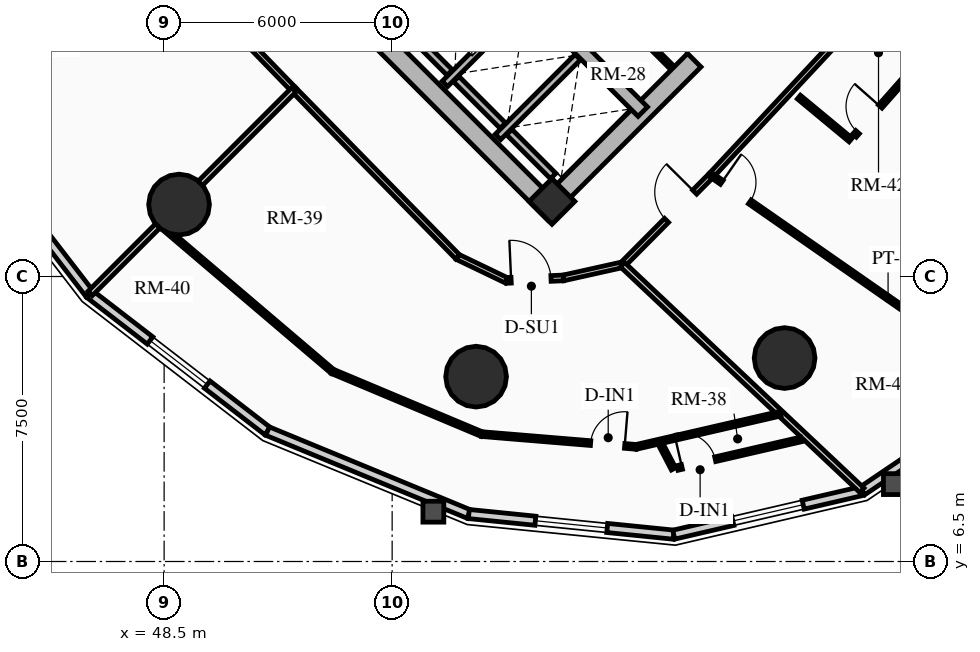
"""IFC4 building model, lengths in metres.
Left out: names, types, materials, properties, quantities, classifications, styles, units other than length and angle.
Written with IfcOpenShell. Run it as: python <this file> out.ifc"""

import sys

from ifc_helpers import new_model, si_unit, direction, frame, frame_2d, origin, origin_2d, place, context, subcontext, project, spatial, rectangle, circle, extrude, source, transform, mapped, element, fill, save


model = new_model("IFC4")
c1 = context("Model", 3, precision=1e-05, world=origin(), true_north=direction((0.0, 1.0)))
c2 = subcontext(c1, "Body", "Model", "MODEL_VIEW")
j1 = project(units=[si_unit("LENGTHUNIT", "METRE"), si_unit("PLANEANGLEUNIT", "RADIAN")], contexts=[c1])
p1 = place(None, origin())
s1 = spatial("IfcSite", under=j1, at=p1, CompositionType="ELEMENT")
p2 = place(p1, origin())
s2 = spatial("IfcBuilding", under=s1, at=p2, CompositionType="ELEMENT")
p3 = place(p2, frame((0.0, 0.0, 45.28)))
s3 = spatial("IfcBuildingStorey", under=s2, at=p3, CompositionType="ELEMENT", Elevation=45.28)
p4 = place(p3, frame((58.773, 15.661, 0.0), z_axis=(0.0, 0.0, 1.0), x_axis=(-0.707106781187, 0.707106781187, 0.0)))
e1 = element("IfcWall", 1, at=p4, inside=s3, PredefinedType="SHEAR", context=c2, shape_type="SweptSolid", body=[
    extrude(rectangle(XDim=14.3, YDim=0.5, at=frame_2d((7.15, 0.0))), origin(), (0.0, 0.0, 1.0), 2.91),
])
p5 = place(p3, frame((58.596, 15.838, 0.0), z_axis=(0.0, 0.0, 1.0), x_axis=(0.707106781187, 0.707106781187, 0.0)))
e2 = element("IfcWall", 2, at=p5, inside=s3, PredefinedType="SHEAR", context=c2, shape_type="SweptSolid", body=[
    extrude(rectangle(XDim=10.7, YDim=0.5, at=frame_2d((5.35, 0.0))), origin(), (0.0, 0.0, 1.0), 2.91),
])
m1 = source(origin(), c2, "Body", "SweptSolid", [
    extrude(rectangle(XDim=1.5, YDim=2.02, at=frame_2d((0.75, 1.01))), frame((0.0, 0.26, 0.0), z_axis=(0.0, -1.0, 0.0), x_axis=(1.0, 0.0, 0.0)), (0.0, 0.0, 1.0), 0.52),
])
p6 = place(p5, frame((5.45, 0.0, 0.0)))
e3 = element("IfcOpeningElement", 3, at=p6, cuts=e2, PredefinedType="OPENING", context=c2, shape_type="MappedRepresentation", body=[
    mapped(m1, transform((0.0, 0.0, 0.0), x_axis=(1.0, 0.0, 0.0), y_axis=(0.0, 1.0, 0.0), z_axis=(0.0, 0.0, 1.0), scale=1.0)),
])
p7 = place(p3, frame((61.096, 18.338, 0.0), z_axis=(0.0, 0.0, 1.0), x_axis=(-0.707106781187, 0.707106781187, 0.0)))
e4 = element("IfcWall", 4, at=p7, inside=s3, PredefinedType="SHEAR", context=c2, shape_type="SweptSolid", body=[
    extrude(rectangle(XDim=13.8, YDim=0.35, at=frame_2d((6.9, 0.0))), origin(), (0.0, 0.0, 1.0), 2.91),
])
m2 = source(origin(), c2, "Body", "SweptSolid", [
    extrude(rectangle(XDim=1.1, YDim=2.015, at=frame_2d((0.55, 1.007))), frame((0.0, 0.185, 0.0), z_axis=(0.0, -1.0, 0.0), x_axis=(1.0, 0.0, 0.0)), (0.0, 0.0, 1.0), 0.37),
])
p8 = place(p7, frame((4.9, 0.0, 0.0)))
e5 = element("IfcOpeningElement", 5, at=p8, cuts=e4, PredefinedType="OPENING", context=c2, shape_type="MappedRepresentation", body=[
    mapped(m2, transform((0.0, 0.0, 0.0), x_axis=(1.0, 0.0, 0.0), y_axis=(0.0, 1.0, 0.0), z_axis=(0.0, 0.0, 1.0), scale=1.0)),
])
m3 = source(origin(), c2, "Body", "SweptSolid", [
    extrude(rectangle(XDim=1.15, YDim=2.02, at=frame_2d((0.575, 1.01))), frame((0.0, 0.185, 0.0), z_axis=(0.0, -1.0, 0.0), x_axis=(1.0, 0.0, 0.0)), (0.0, 0.0, 1.0), 0.37),
])
p9 = place(p7, frame((7.32, 0.0, 0.0)))
e6 = element("IfcOpeningElement", 6, at=p9, cuts=e4, PredefinedType="OPENING", context=c2, shape_type="MappedRepresentation", body=[
    mapped(m3, transform((0.0, 0.0, 0.0), x_axis=(1.0, 0.0, 0.0), y_axis=(0.0, 1.0, 0.0), z_axis=(0.0, 0.0, 1.0), scale=1.0)),
])
p10 = place(p3, frame((58.706, 15.976, 0.0), z_axis=(0.0, 0.0, 1.0), x_axis=(0.707106781187, 0.707106781187, 0.0)))
e7 = element("IfcColumn", 7, at=p10, inside=s3, PredefinedType="COLUMN", context=c2, shape_type="SweptSolid", body=[
    extrude(rectangle(XDim=0.85, YDim=0.85, at=origin_2d()), origin(), (0.0, 0.0, 1.0), 2.91),
])
for number, where, z_axis, x_axis in (
    (8, (48.893, 15.893, 0.0), (0.0, 0.0, 1.0), (1.0, 0.0, 0.0)),
    (9, (56.709, 11.365, 0.0), (0.0, 0.0, 1.0), (1.0, 0.0, 0.0)),
    (10, (64.827, 11.854, 0.0), (0.0, 0.0, 1.0), (1.0, 0.0, 0.0)),
):
    element("IfcColumn", number, at=place(p3, frame(where, z_axis=z_axis, x_axis=x_axis)), inside=s3, PredefinedType="USERDEFINED", context=c2, shape_type="SweptSolid", body=[
        extrude(circle(Radius=0.8, at=origin_2d()), origin(), (0.0, 0.0, 1.0), 2.91),
    ])
p11 = place(p3, frame((46.541, 13.541, 0.0), z_axis=(0.0, 0.0, 1.0), x_axis=(-0.610494906082, 0.792020182601, 0.0)))
e11 = element("IfcWall", 11, at=p11, inside=s3, PredefinedType="SOLIDWALL", context=c2, shape_type="SweptSolid", body=[
    extrude(rectangle(XDim=5.911, YDim=0.24, at=frame_2d((2.956, 0.0))), origin(), (0.0, 0.0, 1.0), 2.073),
])
p12 = place(p3, frame((51.222, 9.932, 0.0), z_axis=(0.0, 0.0, 1.0), x_axis=(-0.792020182601, 0.610494906082, 0.0)))
e12 = element("IfcWall", 12, at=p12, inside=s3, PredefinedType="SOLIDWALL", context=c2, shape_type="SweptSolid", body=[
    extrude(rectangle(XDim=5.911, YDim=0.24, at=frame_2d((2.956, 0.0))), origin(), (0.0, 0.0, 1.0), 2.073),
])
m4 = source(origin(), c2, "Body", "SweptSolid", [
    extrude(rectangle(XDim=1.9, YDim=1.35, at=frame_2d((0.95, 0.675))), frame((0.0, 0.13, 0.0), z_axis=(0.0, -1.0, 0.0), x_axis=(1.0, 0.0, 0.0)), (0.0, 0.0, 1.0), 0.26),
])
p13 = place(p12, frame((2.005, 0.0, 0.65)))
e13 = element("IfcOpeningElement", 13, at=p13, cuts=e12, PredefinedType="OPENING", context=c2, shape_type="MappedRepresentation", body=[
    mapped(m4, transform((0.0, 0.0, 0.0), x_axis=(1.0, 0.0, 0.0), y_axis=(0.0, 1.0, 0.0), z_axis=(0.0, 0.0, 1.0), scale=1.0)),
])
p14 = place(p3, frame((56.518, 7.749, 0.0), z_axis=(0.0, 0.0, 1.0), x_axis=(-0.924542988536, 0.381077764176, 0.0)))
e14 = element("IfcWall", 14, at=p14, inside=s3, PredefinedType="SOLIDWALL", context=c2, shape_type="SweptSolid", body=[
    extrude(rectangle(XDim=5.728, YDim=0.24, at=frame_2d((2.864, 0.0))), origin(), (0.0, 0.0, 1.0), 2.073),
])
p15 = place(p3, frame((61.91, 7.206, 0.0), z_axis=(0.0, 0.0, 1.0), x_axis=(-0.994968263437, 0.100190592135, 0.0)))
e15 = element("IfcWall", 15, at=p15, inside=s3, PredefinedType="SOLIDWALL", context=c2, shape_type="SweptSolid", body=[
    extrude(rectangle(XDim=5.419, YDim=0.24, at=frame_2d((2.71, 0.0))), origin(), (0.0, 0.0, 1.0), 2.073),
])
p16 = place(p15, frame((1.76, 0.0, 0.65)))
e16 = element("IfcOpeningElement", 16, at=p16, cuts=e15, PredefinedType="OPENING", context=c2, shape_type="MappedRepresentation", body=[
    mapped(m4, transform((0.0, 0.0, 0.0), x_axis=(1.0, 0.0, 0.0), y_axis=(0.0, 1.0, 0.0), z_axis=(0.0, 0.0, 1.0), scale=1.0)),
])
p17 = place(p3, frame((66.871, 8.356, 0.0), z_axis=(0.0, 0.0, 1.0), x_axis=(-0.974167686491, -0.22582585901, 0.0)))
e17 = element("IfcWall", 17, at=p17, inside=s3, PredefinedType="SOLIDWALL", context=c2, shape_type="SweptSolid", body=[
    extrude(rectangle(XDim=5.092, YDim=0.24, at=frame_2d((2.546, 0.0))), origin(), (0.0, 0.0, 1.0), 2.073),
])
p18 = place(p17, frame((1.596, 0.0, 0.65)))
e18 = element("IfcOpeningElement", 18, at=p18, cuts=e17, PredefinedType="OPENING", context=c2, shape_type="MappedRepresentation", body=[
    mapped(m4, transform((0.0, 0.0, 0.0), x_axis=(1.0, 0.0, 0.0), y_axis=(0.0, 1.0, 0.0), z_axis=(0.0, 0.0, 1.0), scale=1.0)),
])
p19 = place(p3, frame((70.914, 11.086, 0.0), z_axis=(0.0, 0.0, 1.0), x_axis=(-0.828748297084, -0.559621532896, 0.0)))
e19 = element("IfcWall", 19, at=p19, inside=s3, PredefinedType="SOLIDWALL", context=c2, shape_type="SweptSolid", body=[
    extrude(rectangle(XDim=4.879, YDim=0.24, at=frame_2d((2.439, 0.0))), origin(), (0.0, 0.0, 1.0), 2.073),
])
p20 = place(p3, frame((55.888, 19.069, 0.0), z_axis=(0.0, 0.0, 1.0), x_axis=(0.707106781187, 0.707106781187, 0.0)))
e20 = element("IfcWall", 20, at=p20, inside=s3, PredefinedType="SHEAR", context=c2, shape_type="SweptSolid", body=[
    extrude(rectangle(XDim=2.97, YDim=0.2, at=frame_2d((1.485, 0.0))), origin(), (0.0, 0.0, 1.0), 2.91),
])
p21 = place(p3, frame((56.015, 19.366, 0.0), z_axis=(0.0, 0.0, 1.0), x_axis=(-0.707106781187, 0.707106781187, 0.0)))
e21 = element("IfcWall", 21, at=p21, inside=s3, PredefinedType="SHEAR", context=c2, shape_type="SweptSolid", body=[
    extrude(rectangle(XDim=2.44, YDim=0.2, at=frame_2d((1.22, 0.0))), origin(), (0.0, 0.0, 1.0), 2.91),
])
p22 = place(p3, frame((57.284, 17.673, 0.0), z_axis=(0.0, 0.0, 1.0), x_axis=(0.707147878904, 0.70706568108, 0.0)))
e22 = element("IfcWall", 22, at=p22, inside=s3, PredefinedType="SHEAR", context=c2, shape_type="SweptSolid", body=[
    extrude(rectangle(XDim=2.97, YDim=0.2, at=frame_2d((1.485, 0.0))), origin(), (0.0, 0.0, 1.0), 2.91),
])
p23 = place(p3, frame((57.412, 17.97, 0.0), z_axis=(0.0, 0.0, 1.0), x_axis=(-0.707106781187, 0.707106781187, 0.0)))
e23 = element("IfcWall", 23, at=p23, inside=s3, PredefinedType="SHEAR", context=c2, shape_type="SweptSolid", body=[
    extrude(rectangle(XDim=1.735, YDim=0.2, at=frame_2d((0.867, 0.0))), origin(), (0.0, 0.0, 1.0), 2.91),
])
p24 = place(p3, frame((58.737, 16.644, 0.0), z_axis=(0.0, 0.0, 1.0), x_axis=(-0.707032117043, 0.707181437447, 0.0)))
e24 = element("IfcWall", 24, at=p24, inside=s3, PredefinedType="SHEAR", context=c2, shape_type="SweptSolid", body=[
    extrude(rectangle(XDim=1.635, YDim=0.2, at=frame_2d((0.817, 0.0))), origin(), (0.0, 0.0, 1.0), 2.91),
])
p25 = place(p3, frame((61.835, 19.529, 0.0), z_axis=(0.0, 0.0, 1.0), x_axis=(-0.707146413884, 0.707067146267, 0.0)))
e25 = element("IfcWall", 25, at=p25, inside=s3, PredefinedType="PARTITIONING", context=c2, shape_type="SweptSolid", body=[
    extrude(rectangle(XDim=3.08, YDim=0.125, at=frame_2d((1.54, 0.0))), origin(), (0.0, 0.0, 1.0), 2.635),
])
m5 = source(origin(), c2, "Body", "SweptSolid", [
    extrude(rectangle(XDim=0.9, YDim=2.005, at=frame_2d((0.45, 1.002))), frame((0.0, 0.073, 0.0), z_axis=(0.0, -1.0, 0.0), x_axis=(1.0, 0.0, 0.0)), (0.0, 0.0, 1.0), 0.145),
])
p26 = place(p25, frame((1.05, 0.0, 0.0)))
e26 = element("IfcOpeningElement", 26, at=p26, cuts=e25, PredefinedType="OPENING", context=c2, shape_type="MappedRepresentation", body=[
    mapped(m5, transform((0.0, 0.0, 0.0), x_axis=(1.0, 0.0, 0.0), y_axis=(0.0, 1.0, 0.0), z_axis=(0.0, 0.0, 1.0), scale=1.0)),
])
p27 = place(p3, frame((47.706, 23.253, 0.0), z_axis=(0.0, 0.0, 1.0), x_axis=(0.696179266346, -0.717867974707, 0.0)))
e27 = element("IfcWall", 27, at=p27, inside=s3, PredefinedType="PARTITIONING", context=c2, shape_type="SweptSolid", body=[
    extrude(rectangle(XDim=6.045, YDim=0.15, at=frame_2d((3.022, 0.0))), origin(), (0.0, 0.0, 1.0), 2.635),
])
m6 = source(origin(), c2, "Body", "SweptSolid", [
    extrude(rectangle(XDim=1.05, YDim=2.015, at=frame_2d((0.525, 1.007))), frame((0.0, 0.085, 0.0), z_axis=(0.0, -1.0, 0.0), x_axis=(1.0, 0.0, 0.0)), (0.0, 0.0, 1.0), 0.17),
])
p28 = place(p27, frame((2.497, 0.0, 0.0)))
e28 = element("IfcOpeningElement", 28, at=p28, cuts=e27, PredefinedType="OPENING", context=c2, shape_type="MappedRepresentation", body=[
    mapped(m6, transform((0.0, 0.0, 0.0), x_axis=(1.0, 0.0, 0.0), y_axis=(0.0, 1.0, 0.0), z_axis=(0.0, 0.0, 1.0), scale=1.0)),
])
p29 = place(p3, frame((51.914, 18.914, 0.0), z_axis=(0.0, 0.0, 1.0), x_axis=(0.699999313799, -0.714143515465, 0.0)))
e29 = element("IfcWall", 29, at=p29, inside=s3, PredefinedType="PARTITIONING", context=c2, shape_type="SweptSolid", body=[
    extrude(rectangle(XDim=6.162, YDim=0.15, at=frame_2d((3.081, 0.0))), origin(), (0.0, 0.0, 1.0), 2.159),
])
p30 = place(p3, frame((56.227, 14.513, 0.0), z_axis=(0.0, 0.0, 1.0), x_axis=(0.901477579283, -0.432825801044, 0.0)))
e30 = element("IfcWall", 30, at=p30, inside=s3, PredefinedType="PARTITIONING", context=c2, shape_type="SweptSolid", body=[
    extrude(rectangle(XDim=1.424, YDim=0.15, at=frame_2d((0.712, 0.0))), origin(), (0.0, 0.0, 1.0), 2.205),
])
p31 = place(p3, frame((57.511, 13.897, 0.0), z_axis=(0.0, 0.0, 1.0), x_axis=(0.999024538494, 0.044158481476, 0.0)))
e31 = element("IfcWall", 31, at=p31, inside=s3, PredefinedType="PARTITIONING", context=c2, shape_type="SweptSolid", body=[
    extrude(rectangle(XDim=1.498, YDim=0.15, at=frame_2d((0.749, 0.0))), origin(), (0.0, 0.0, 1.0), 2.159),
])
p32 = place(p31, frame((0.12, 0.0, 0.0)))
e32 = element("IfcOpeningElement", 32, at=p32, cuts=e31, PredefinedType="OPENING", context=c2, shape_type="MappedRepresentation", body=[
    mapped(m6, transform((0.0, 0.0, 0.0), x_axis=(1.0, 0.0, 0.0), y_axis=(0.0, 1.0, 0.0), z_axis=(0.0, 0.0, 1.0), scale=1.0)),
])
p33 = place(p3, frame((59.008, 13.963, 0.0), z_axis=(0.0, 0.0, 1.0), x_axis=(0.976020856791, 0.21767702476, 0.0)))
e33 = element("IfcWall", 33, at=p33, inside=s3, PredefinedType="PARTITIONING", context=c2, shape_type="SweptSolid", body=[
    extrude(rectangle(XDim=1.593, YDim=0.15, at=frame_2d((0.796, 0.0))), origin(), (0.0, 0.0, 1.0), 2.205),
])
p34 = place(p3, frame((60.562, 14.31, 0.0), z_axis=(0.0, 0.0, 1.0), x_axis=(0.704566236161, 0.709638230975, 0.0)))
e34 = element("IfcWall", 34, at=p34, inside=s3, PredefinedType="PARTITIONING", context=c2, shape_type="SweptSolid", body=[
    extrude(rectangle(XDim=3.321, YDim=0.15, at=frame_2d((1.661, 0.0))), origin(), (0.0, 0.0, 1.0), 2.159),
])
p35 = place(p34, frame((1.643, 0.0, 0.0)))
e35 = element("IfcOpeningElement", 35, at=p35, cuts=e34, PredefinedType="OPENING", context=c2, shape_type="MappedRepresentation", body=[
    mapped(m6, transform((0.0, 0.0, 0.0), x_axis=(1.0, 0.0, 0.0), y_axis=(0.0, 1.0, 0.0), z_axis=(0.0, 0.0, 1.0), scale=1.0)),
])
p36 = place(p3, frame((62.903, 16.667, 0.0), z_axis=(0.0, 0.0, 1.0), x_axis=(0.682371947497, 0.731005147225, 0.0)))
e36 = element("IfcWall", 36, at=p36, inside=s3, PredefinedType="PARTITIONING", context=c2, shape_type="SweptSolid", body=[
    extrude(rectangle(XDim=6.642, YDim=0.15, at=frame_2d((3.321, 0.0))), origin(), (0.0, 0.0, 1.0), 2.159),
])
p37 = place(p3, frame((51.914, 18.914, 0.0), z_axis=(0.0, 0.0, 1.0), x_axis=(-0.707106781187, -0.707106781187, 0.0)))
e37 = element("IfcWall", 37, at=p37, inside=s3, PredefinedType="PARTITIONING", context=c2, shape_type="SweptSolid", body=[
    extrude(rectangle(XDim=7.579, YDim=0.16, at=frame_2d((3.79, 0.0))), origin(), (0.0, 0.0, 1.0), 2.073),
])
p38 = place(p3, frame((60.562, 14.31, 0.0), z_axis=(0.0, 0.0, 1.0), x_axis=(0.727781661561, -0.685808904211, 0.0)))
e38 = element("IfcWall", 38, at=p38, inside=s3, PredefinedType="PARTITIONING", context=c2, shape_type="SweptSolid", body=[
    extrude(rectangle(XDim=8.655, YDim=0.16, at=frame_2d((4.328, 0.0))), origin(), (0.0, 0.0, 1.0), 2.073),
])
p39 = place(p3, frame((67.435, 21.521, 0.0), z_axis=(0.0, 0.0, 1.0), x_axis=(0.6962628802, -0.717786877601, 0.0)))
e39 = element("IfcWall", 39, at=p39, inside=s3, PredefinedType="PARTITIONING", context=c2, shape_type="SweptSolid", body=[
    extrude(rectangle(XDim=8.893, YDim=0.16, at=frame_2d((4.446, 0.0))), origin(), (0.0, 0.0, 1.0), 2.073),
])
p40 = place(p3, frame((48.377, 15.377, 0.0), z_axis=(0.0, 0.0, 1.0), x_axis=(0.761505943152, -0.648157927163, 0.0)))
e40 = element("IfcWall", 40, at=p40, inside=s3, PredefinedType="PARTITIONING", context=c2, shape_type="SweptSolid", body=[
    extrude(rectangle(XDim=5.979, YDim=0.125, at=frame_2d((2.99, 0.0))), origin(), (0.0, 0.0, 1.0), 2.635),
])
p41 = place(p3, frame((52.93, 11.501, 0.0), z_axis=(0.0, 0.0, 1.0), x_axis=(0.922051248037, -0.387067818338, 0.0)))
e41 = element("IfcWall", 41, at=p41, inside=s3, PredefinedType="PARTITIONING", context=c2, shape_type="SweptSolid", body=[
    extrude(rectangle(XDim=4.26, YDim=0.125, at=frame_2d((2.13, 0.0))), origin(), (0.0, 0.0, 1.0), 2.159),
])
p42 = place(p3, frame((56.858, 9.852, 0.0), z_axis=(0.0, 0.0, 1.0), x_axis=(0.996604967548, -0.082331881181, 0.0)))
e42 = element("IfcWall", 42, at=p42, inside=s3, PredefinedType="PARTITIONING", context=c2, shape_type="SweptSolid", body=[
    extrude(rectangle(XDim=4.077, YDim=0.125, at=frame_2d((2.039, 0.0))), origin(), (0.0, 0.0, 1.0), 2.205),
])
p43 = place(p42, frame((2.874, 0.0, 0.0)))
e43 = element("IfcOpeningElement", 43, at=p43, cuts=e42, PredefinedType="OPENING", context=c2, shape_type="MappedRepresentation", body=[
    mapped(m5, transform((0.0, 0.0, 0.0), x_axis=(1.0, 0.0, 0.0), y_axis=(0.0, 1.0, 0.0), z_axis=(0.0, 0.0, 1.0), scale=1.0)),
])
p44 = place(p3, frame((60.921, 9.517, 0.0), z_axis=(0.0, 0.0, 1.0), x_axis=(0.974453436038, 0.224589627973, 0.0)))
e44 = element("IfcWall", 44, at=p44, inside=s3, PredefinedType="PARTITIONING", context=c2, shape_type="SweptSolid", body=[
    extrude(rectangle(XDim=3.898, YDim=0.125, at=frame_2d((1.949, 0.0))), origin(), (0.0, 0.0, 1.0), 2.205),
])
p45 = place(p3, frame((61.564, 9.589, 0.0), z_axis=(0.0, 0.0, 1.0), x_axis=(0.462168536246, -0.886792108729, 0.0)))
e45 = element("IfcWall", 45, at=p45, inside=s3, PredefinedType="PARTITIONING", context=c2, shape_type="SweptSolid", body=[
    extrude(rectangle(XDim=0.735, YDim=0.125, at=frame_2d((0.367, 0.0))), origin(), (0.0, 0.0, 1.0), 2.635),
])
p46 = place(p3, frame((62.008, 8.962, 0.0), z_axis=(0.0, 0.0, 1.0), x_axis=(0.974365294983, 0.224971713626, 0.0)))
e46 = element("IfcWall", 46, at=p46, inside=s3, PredefinedType="PARTITIONING", context=c2, shape_type="SweptSolid", body=[
    extrude(rectangle(XDim=3.337, YDim=0.125, at=frame_2d((1.668, 0.0))), origin(), (0.0, 0.0, 1.0), 2.635),
])
p47 = place(p46, frame((0.12, 0.0, 0.0)))
e47 = element("IfcOpeningElement", 47, at=p47, cuts=e46, PredefinedType="OPENING", context=c2, shape_type="MappedRepresentation", body=[
    mapped(m5, transform((0.0, 0.0, 0.0), x_axis=(1.0, 0.0, 0.0), y_axis=(0.0, 1.0, 0.0), z_axis=(0.0, 0.0, 1.0), scale=1.0)),
])
p48 = place(p3, frame((62.903, 16.667, 0.0), z_axis=(0.0, 0.0, 1.0), x_axis=(0.820761665638, -0.571270766116, 0.0)))
e48 = element("IfcWall", 48, at=p48, inside=s3, PredefinedType="PARTITIONING", context=c2, shape_type="SweptSolid", body=[
    extrude(rectangle(XDim=9.743, YDim=0.125, at=frame_2d((4.872, 0.0))), origin(), (0.0, 0.0, 1.0), 2.073),
])
p49 = place(p48, frame((0.33, 0.0, 0.0)))
e49 = element("IfcOpeningElement", 49, at=p49, cuts=e48, PredefinedType="OPENING", context=c2, shape_type="MappedRepresentation", body=[
    mapped(m5, transform((0.0, 0.0, 0.0), x_axis=(1.0, 0.0, 0.0), y_axis=(0.0, 1.0, 0.0), z_axis=(0.0, 0.0, 1.0), scale=1.0)),
])
p50 = place(p3, frame((65.202, 18.721, 0.0), z_axis=(0.0, 0.0, 1.0), x_axis=(0.769814202386, -0.638268042287, 0.0)))
e50 = element("IfcWall", 50, at=p50, inside=s3, PredefinedType="PARTITIONING", context=c2, shape_type="SweptSolid", body=[
    extrude(rectangle(XDim=1.769, YDim=0.125, at=frame_2d((0.884, 0.0))), origin(), (0.0, 0.0, 1.0), 2.635),
])
p51 = place(p3, frame((66.667, 17.709, 0.0), z_axis=(0.0, 0.0, 1.0), x_axis=(0.662510581678, 0.749052554341, 0.0)))
e51 = element("IfcWall", 51, at=p51, inside=s3, PredefinedType="PARTITIONING", context=c2, shape_type="SweptSolid", body=[
    extrude(rectangle(XDim=2.996, YDim=0.125, at=frame_2d((1.498, 0.0))), origin(), (0.0, 0.0, 1.0), 2.159),
])
p52 = place(p51, frame((0.12, 0.0, 0.0)))
e52 = element("IfcOpeningElement", 52, at=p52, cuts=e51, PredefinedType="OPENING", context=c2, shape_type="MappedRepresentation", body=[
    mapped(m5, transform((0.0, 0.0, 0.0), x_axis=(1.0, 0.0, 0.0), y_axis=(0.0, 1.0, 0.0), z_axis=(0.0, 0.0, 1.0), scale=1.0)),
])
m7 = source(origin(), c2, "Body", "SweptSolid", [
    extrude(rectangle(XDim=1.9, YDim=1.35, at=frame_2d((0.95, 0.675))), frame((0.0, 0.03, 0.0), z_axis=(0.0, -1.0, 0.0), x_axis=(1.0, 0.0, 0.0)), (0.0, 0.0, 1.0), 0.06),
])
p53 = place(p13, origin())
e53 = element("IfcWindow", 53, at=p53, inside=s3, PartitioningType="DOUBLE_PANEL_VERTICAL", PredefinedType="WINDOW", context=c2, shape_type="MappedRepresentation", body=[
    mapped(m7, transform((0.0, 0.0, 0.0), x_axis=(1.0, 0.0, 0.0), y_axis=(0.0, 1.0, 0.0), z_axis=(0.0, 0.0, 1.0), scale=1.0)),
])
fill(e13, e53)
p54 = place(p16, origin())
e54 = element("IfcWindow", 54, at=p54, inside=s3, PartitioningType="DOUBLE_PANEL_VERTICAL", PredefinedType="WINDOW", context=c2, shape_type="MappedRepresentation", body=[
    mapped(m7, transform((0.0, 0.0, 0.0), x_axis=(1.0, 0.0, 0.0), y_axis=(0.0, 1.0, 0.0), z_axis=(0.0, 0.0, 1.0), scale=1.0)),
])
fill(e16, e54)
p55 = place(p18, origin())
e55 = element("IfcWindow", 55, at=p55, inside=s3, PartitioningType="DOUBLE_PANEL_VERTICAL", PredefinedType="WINDOW", context=c2, shape_type="MappedRepresentation", body=[
    mapped(m7, transform((0.0, 0.0, 0.0), x_axis=(1.0, 0.0, 0.0), y_axis=(0.0, 1.0, 0.0), z_axis=(0.0, 0.0, 1.0), scale=1.0)),
])
fill(e18, e55)
m8 = source(origin(), c2, "Body", "SweptSolid", [
    extrude(rectangle(XDim=1.5, YDim=2.02, at=frame_2d((0.75, 1.01))), frame((0.0, 0.025, 0.0), z_axis=(0.0, -1.0, 0.0), x_axis=(1.0, 0.0, 0.0)), (0.0, 0.0, 1.0), 0.05),
])
p56 = place(p6, origin())
e56 = element("IfcDoor", 56, at=p56, inside=s3, OperationType="DOUBLE_DOOR_SINGLE_SWING", PredefinedType="DOOR", context=c2, shape_type="MappedRepresentation", body=[
    mapped(m8, transform((0.0, 0.0, 0.0), x_axis=(1.0, 0.0, 0.0), y_axis=(0.0, 1.0, 0.0), z_axis=(0.0, 0.0, 1.0), scale=1.0)),
])
fill(e3, e56)
m9 = source(origin(), c2, "Body", "SweptSolid", [
    extrude(rectangle(XDim=1.05, YDim=2.015, at=frame_2d((0.525, 1.007))), frame((0.0, 0.025, 0.0), z_axis=(0.0, -1.0, 0.0), x_axis=(1.0, 0.0, 0.0)), (0.0, 0.0, 1.0), 0.05),
])
p57 = place(p32, origin())
e57 = element("IfcDoor", 57, at=p57, inside=s3, OperationType="SINGLE_SWING_LEFT", PredefinedType="DOOR", context=c2, shape_type="MappedRepresentation", body=[
    mapped(m9, transform((0.0, 0.0, 0.0), x_axis=(1.0, 0.0, 0.0), y_axis=(0.0, 1.0, 0.0), z_axis=(0.0, 0.0, 1.0), scale=1.0)),
])
fill(e32, e57)
m10 = source(origin(), c2, "Body", "SweptSolid", [
    extrude(rectangle(XDim=0.9, YDim=2.005, at=frame_2d((0.45, 1.002))), frame((0.0, 0.025, 0.0), z_axis=(0.0, -1.0, 0.0), x_axis=(1.0, 0.0, 0.0)), (0.0, 0.0, 1.0), 0.05),
])
p58 = place(p43, origin())
e58 = element("IfcDoor", 58, at=p58, inside=s3, OperationType="SINGLE_SWING_RIGHT", PredefinedType="DOOR", context=c2, shape_type="MappedRepresentation", body=[
    mapped(m10, transform((0.0, 0.0, 0.0), x_axis=(1.0, 0.0, 0.0), y_axis=(0.0, 1.0, 0.0), z_axis=(0.0, 0.0, 1.0), scale=1.0)),
])
fill(e43, e58)
p59 = place(p47, origin())
e59 = element("IfcDoor", 59, at=p59, inside=s3, OperationType="SINGLE_SWING_LEFT", PredefinedType="DOOR", context=c2, shape_type="MappedRepresentation", body=[
    mapped(m10, transform((0.0, 0.0, 0.0), x_axis=(1.0, 0.0, 0.0), y_axis=(0.0, 1.0, 0.0), z_axis=(0.0, 0.0, 1.0), scale=1.0)),
])
fill(e47, e59)
p60 = place(p35, origin())
e60 = element("IfcDoor", 60, at=p60, inside=s3, OperationType="SINGLE_SWING_RIGHT", PredefinedType="DOOR", context=c2, shape_type="MappedRepresentation", body=[
    mapped(m9, transform((0.0, 0.0, 0.0), x_axis=(1.0, 0.0, 0.0), y_axis=(0.0, 1.0, 0.0), z_axis=(0.0, 0.0, 1.0), scale=1.0)),
])
fill(e35, e60)
p61 = place(p49, origin())
e61 = element("IfcDoor", 61, at=p61, inside=s3, OperationType="SINGLE_SWING_LEFT", PredefinedType="DOOR", context=c2, shape_type="MappedRepresentation", body=[
    mapped(m10, transform((0.0, 0.0, 0.0), x_axis=(1.0, 0.0, 0.0), y_axis=(0.0, 1.0, 0.0), z_axis=(0.0, 0.0, 1.0), scale=1.0)),
])
fill(e49, e61)
p62 = place(p52, origin())
e62 = element("IfcDoor", 62, at=p62, inside=s3, OperationType="SINGLE_SWING_RIGHT", PredefinedType="DOOR", context=c2, shape_type="MappedRepresentation", body=[
    mapped(m10, transform((0.0, 0.0, 0.0), x_axis=(1.0, 0.0, 0.0), y_axis=(0.0, 1.0, 0.0), z_axis=(0.0, 0.0, 1.0), scale=1.0)),
])
fill(e52, e62)
save(model, sys.argv[1])
